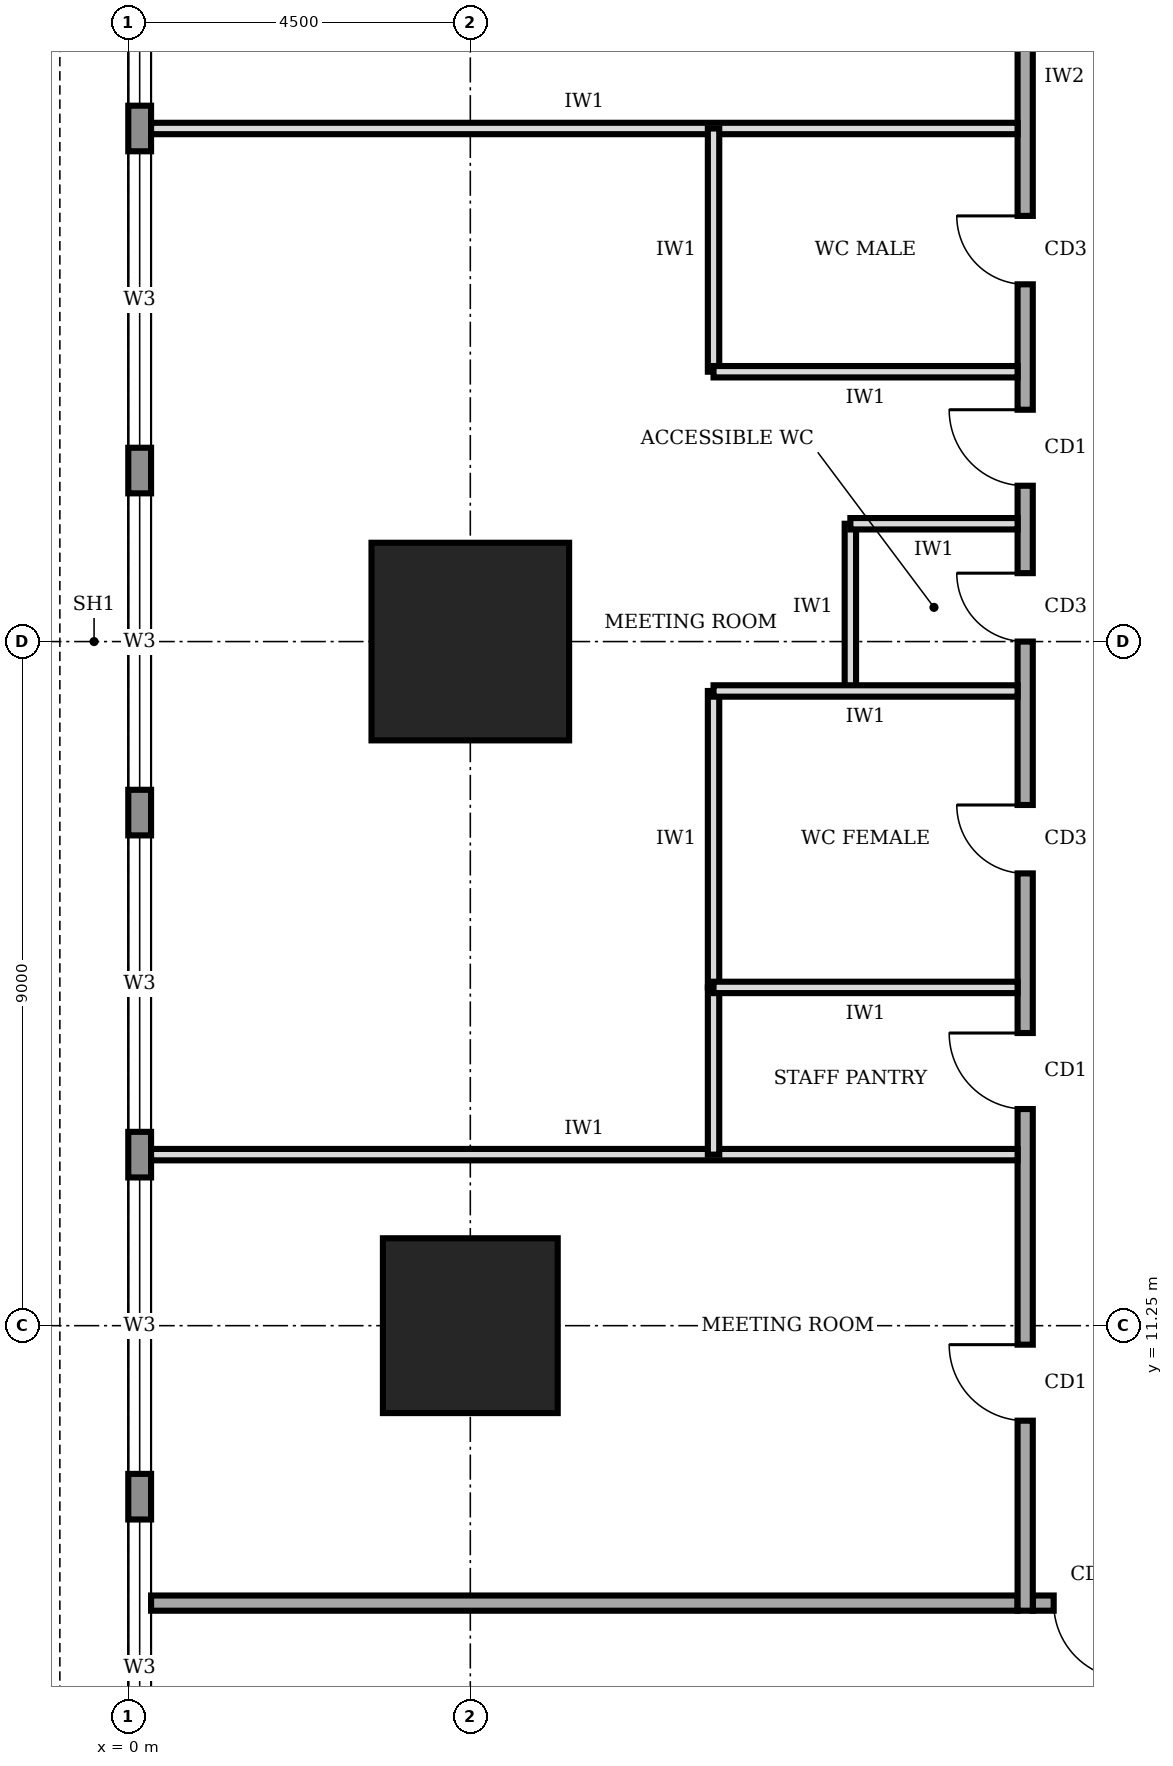
"""IFC4 building model, lengths in metres.
Left out: names, types, materials, properties, quantities, classifications, styles, units other than length and angle.
Written with IfcOpenShell. Run it as: python <this file> out.ifc"""

import sys

from ifc_helpers import new_model, si_unit, direction, frame, frame_2d, origin, origin_2d, place, context, subcontext, project, spatial, rectangle, extrude, element, fill, save


model = new_model("IFC4")
c1 = context("Model", 3, precision=1e-05, world=origin(), true_north=direction((0.0, 1.0)))
c2 = subcontext(c1, "Body", "Model", "MODEL_VIEW")
j1 = project(units=[si_unit("LENGTHUNIT", "METRE"), si_unit("PLANEANGLEUNIT", "RADIAN")], contexts=[c1])
p1 = place(None, origin())
s1 = spatial("IfcSite", under=j1, at=p1, CompositionType="ELEMENT")
p2 = place(p1, origin())
s2 = spatial("IfcBuilding", under=s1, at=p2, CompositionType="ELEMENT")
p3 = place(p2, frame((0.0, 0.0, 93.0)))
s3 = spatial("IfcBuildingStorey", under=s2, at=p3, CompositionType="ELEMENT", Elevation=93.0)
p4 = place(p3, frame((4.5, 11.25, 0.0), z_axis=(0.0, 0.0, 1.0), x_axis=(1.0, 0.0, 0.0)))
e1 = element("IfcColumn", 1, at=p4, inside=s3, PredefinedType="COLUMN", context=c2, shape_type="SweptSolid", body=[
    extrude(rectangle(XDim=2.3, YDim=2.3, at=origin_2d()), origin(), (0.0, 0.0, 1.0), 4.0),
])
p5 = place(p3, frame((4.5, 20.25, 0.0), z_axis=(0.0, 0.0, 1.0), x_axis=(1.0, 0.0, 0.0)))
e2 = element("IfcColumn", 2, at=p5, inside=s3, PredefinedType="COLUMN", context=c2, shape_type="SweptSolid", body=[
    extrude(rectangle(XDim=2.6, YDim=2.6, at=origin_2d()), origin(), (0.0, 0.0, 1.0), 4.0),
])
p6 = place(p3, frame((0.15, 35.98, 0.0), z_axis=(0.0, 0.0, 1.0), x_axis=(0.0, -1.0, 0.0)))
e3 = element("IfcWall", 3, at=p6, inside=s3, PredefinedType="STANDARD", context=c2, shape_type="SweptSolid", body=[
    extrude(rectangle(XDim=31.46, YDim=0.3, at=frame_2d((15.73, 0.0))), origin(), (0.0, 0.0, 1.0), 3.75),
])
p7 = place(p6, frame((27.28, 0.0, 0.95)))
e4 = element("IfcOpeningElement", 4, at=p7, cuts=e3, PredefinedType="OPENING", context=c2, shape_type="SweptSolid", body=[
    extrude(rectangle(XDim=3.9, YDim=1.8, at=frame_2d((1.95, 0.9))), frame((0.0, 0.16, 0.0), z_axis=(0.0, -1.0, 0.0), x_axis=(1.0, 0.0, 0.0)), (0.0, 0.0, 1.0), 0.32),
])
p8 = place(p6, frame((22.78, 0.0, 0.95)))
e5 = element("IfcOpeningElement", 5, at=p8, cuts=e3, PredefinedType="OPENING", context=c2, shape_type="SweptSolid", body=[
    extrude(rectangle(XDim=3.9, YDim=1.8, at=frame_2d((1.95, 0.9))), frame((0.0, 0.16, 0.0), z_axis=(0.0, -1.0, 0.0), x_axis=(1.0, 0.0, 0.0)), (0.0, 0.0, 1.0), 0.32),
])
p9 = place(p6, frame((18.28, 0.0, 0.95)))
e6 = element("IfcOpeningElement", 6, at=p9, cuts=e3, PredefinedType="OPENING", context=c2, shape_type="SweptSolid", body=[
    extrude(rectangle(XDim=3.9, YDim=1.8, at=frame_2d((1.95, 0.9))), frame((0.0, 0.16, 0.0), z_axis=(0.0, -1.0, 0.0), x_axis=(1.0, 0.0, 0.0)), (0.0, 0.0, 1.0), 0.32),
])
p10 = place(p6, frame((13.78, 0.0, 0.95)))
e7 = element("IfcOpeningElement", 7, at=p10, cuts=e3, PredefinedType="OPENING", context=c2, shape_type="SweptSolid", body=[
    extrude(rectangle(XDim=3.9, YDim=1.8, at=frame_2d((1.95, 0.9))), frame((0.0, 0.16, 0.0), z_axis=(0.0, -1.0, 0.0), x_axis=(1.0, 0.0, 0.0)), (0.0, 0.0, 1.0), 0.32),
])
p11 = place(p6, frame((9.28, 0.0, 0.95)))
e8 = element("IfcOpeningElement", 8, at=p11, cuts=e3, PredefinedType="OPENING", context=c2, shape_type="SweptSolid", body=[
    extrude(rectangle(XDim=3.9, YDim=1.8, at=frame_2d((1.95, 0.9))), frame((0.0, 0.16, 0.0), z_axis=(0.0, -1.0, 0.0), x_axis=(1.0, 0.0, 0.0)), (0.0, 0.0, 1.0), 0.32),
])
p12 = place(p6, frame((4.78, 0.0, 0.95)))
e9 = element("IfcOpeningElement", 9, at=p12, cuts=e3, PredefinedType="OPENING", context=c2, shape_type="SweptSolid", body=[
    extrude(rectangle(XDim=3.9, YDim=1.8, at=frame_2d((1.95, 0.9))), frame((0.0, 0.16, 0.0), z_axis=(0.0, -1.0, 0.0), x_axis=(1.0, 0.0, 0.0)), (0.0, 0.0, 1.0), 0.32),
])
p13 = place(p3, frame((11.9, 7.6, 0.0), z_axis=(0.0, 0.0, 1.0), x_axis=(1.0, 0.0, 0.0)))
e10 = element("IfcWall", 10, at=p13, inside=s3, PredefinedType="SOLIDWALL", context=c2, shape_type="SweptSolid", body=[
    extrude(rectangle(XDim=28.3, YDim=0.2, at=frame_2d((14.15, 0.0))), origin(), (0.0, 0.0, 1.0), 3.75),
])
p14 = place(p13, frame((0.275, 0.0, 0.0)))
e11 = element("IfcOpeningElement", 11, at=p14, cuts=e10, PredefinedType="OPENING", context=c2, shape_type="SweptSolid", body=[
    extrude(rectangle(XDim=1.0, YDim=2.1, at=frame_2d((0.5, 1.05))), frame((0.0, 0.11, 0.0), z_axis=(0.0, -1.0, 0.0), x_axis=(1.0, 0.0, 0.0)), (0.0, 0.0, 1.0), 0.22),
])
p15 = place(p13, frame((7.45, 0.0, 0.0)))
e12 = element("IfcOpeningElement", 12, at=p15, cuts=e10, PredefinedType="OPENING", context=c2, shape_type="SweptSolid", body=[
    extrude(rectangle(XDim=1.8, YDim=2.1, at=frame_2d((0.9, 1.05))), frame((0.0, 0.11, 0.0), z_axis=(0.0, -1.0, 0.0), x_axis=(1.0, 0.0, 0.0)), (0.0, 0.0, 1.0), 0.22),
])
p16 = place(p13, frame((21.3, 0.0, 0.0)))
e13 = element("IfcOpeningElement", 13, at=p16, cuts=e10, PredefinedType="OPENING", context=c2, shape_type="SweptSolid", body=[
    extrude(rectangle(XDim=1.0, YDim=2.1, at=frame_2d((0.5, 1.05))), frame((0.0, 0.11, 0.0), z_axis=(0.0, -1.0, 0.0), x_axis=(1.0, 0.0, 0.0)), (0.0, 0.0, 1.0), 0.22),
])
p17 = place(p3, frame((11.8, 32.8, 0.0), z_axis=(0.0, 0.0, 1.0), x_axis=(0.0, -1.0, 0.0)))
e14 = element("IfcWall", 14, at=p17, inside=s3, PredefinedType="SOLIDWALL", context=c2, shape_type="SweptSolid", body=[
    extrude(rectangle(XDim=25.3, YDim=0.2, at=frame_2d((12.65, 0.0))), origin(), (0.0, 0.0, 1.0), 3.75),
])
p18 = place(p17, frame((21.8, 0.0, 0.0)))
e15 = element("IfcOpeningElement", 15, at=p18, cuts=e14, PredefinedType="OPENING", context=c2, shape_type="SweptSolid", body=[
    extrude(rectangle(XDim=1.0, YDim=2.1, at=frame_2d((0.5, 1.05))), frame((0.0, 0.11, 0.0), z_axis=(0.0, -1.0, 0.0), x_axis=(1.0, 0.0, 0.0)), (0.0, 0.0, 1.0), 0.22),
])
p19 = place(p17, frame((17.7, 0.0, 0.0)))
e16 = element("IfcOpeningElement", 16, at=p19, cuts=e14, PredefinedType="OPENING", context=c2, shape_type="SweptSolid", body=[
    extrude(rectangle(XDim=1.0, YDim=2.1, at=frame_2d((0.5, 1.05))), frame((0.0, 0.11, 0.0), z_axis=(0.0, -1.0, 0.0), x_axis=(1.0, 0.0, 0.0)), (0.0, 0.0, 1.0), 0.22),
])
p20 = place(p17, frame((14.7, 0.0, 0.0)))
e17 = element("IfcOpeningElement", 17, at=p20, cuts=e14, PredefinedType="OPENING", context=c2, shape_type="SweptSolid", body=[
    extrude(rectangle(XDim=0.9, YDim=2.1, at=frame_2d((0.45, 1.05))), frame((0.0, 0.11, 0.0), z_axis=(0.0, -1.0, 0.0), x_axis=(1.0, 0.0, 0.0)), (0.0, 0.0, 1.0), 0.22),
])
p21 = place(p17, frame((11.65, 0.0, 0.0)))
e18 = element("IfcOpeningElement", 18, at=p21, cuts=e14, PredefinedType="OPENING", context=c2, shape_type="SweptSolid", body=[
    extrude(rectangle(XDim=0.9, YDim=2.1, at=frame_2d((0.45, 1.05))), frame((0.0, 0.11, 0.0), z_axis=(0.0, -1.0, 0.0), x_axis=(1.0, 0.0, 0.0)), (0.0, 0.0, 1.0), 0.22),
])
p22 = place(p17, frame((6.95, 0.0, 0.0)))
e19 = element("IfcOpeningElement", 19, at=p22, cuts=e14, PredefinedType="OPENING", context=c2, shape_type="SweptSolid", body=[
    extrude(rectangle(XDim=0.9, YDim=2.1, at=frame_2d((0.45, 1.05))), frame((0.0, 0.11, 0.0), z_axis=(0.0, -1.0, 0.0), x_axis=(1.0, 0.0, 0.0)), (0.0, 0.0, 1.0), 0.22),
])
p23 = place(p17, frame((9.5, 0.0, 0.0)))
e20 = element("IfcOpeningElement", 20, at=p23, cuts=e14, PredefinedType="OPENING", context=c2, shape_type="SweptSolid", body=[
    extrude(rectangle(XDim=1.0, YDim=2.1, at=frame_2d((0.5, 1.05))), frame((0.0, 0.11, 0.0), z_axis=(0.0, -1.0, 0.0), x_axis=(1.0, 0.0, 0.0)), (0.0, 0.0, 1.0), 0.22),
])
p24 = place(p17, frame((2.3, 0.0, 0.0)))
e21 = element("IfcOpeningElement", 21, at=p24, cuts=e14, PredefinedType="OPENING", context=c2, shape_type="SweptSolid", body=[
    extrude(rectangle(XDim=1.0, YDim=2.1, at=frame_2d((0.5, 1.05))), frame((0.0, 0.11, 0.0), z_axis=(0.0, -1.0, 0.0), x_axis=(1.0, 0.0, 0.0)), (0.0, 0.0, 1.0), 0.22),
])
p25 = place(p3, frame((0.3, 7.6, 0.0), z_axis=(0.0, 0.0, 1.0), x_axis=(1.0, 0.0, 0.0)))
e22 = element("IfcWall", 22, at=p25, inside=s3, PredefinedType="SOLIDWALL", context=c2, shape_type="SweptSolid", body=[
    extrude(rectangle(XDim=11.4, YDim=0.2, at=frame_2d((5.7, 0.0))), origin(), (0.0, 0.0, 1.0), 3.75),
])
for number, where, z_axis, x_axis in (
    (23, (0.3, 13.5, 0.0), (0.0, 0.0, 1.0), (1.0, 0.0, 0.0)),
    (24, (0.3, 27.0, 0.0), (0.0, 0.0, 1.0), (1.0, 0.0, 0.0)),
):
    element("IfcWall", number, at=place(p3, frame(where, z_axis=z_axis, x_axis=x_axis)), inside=s3, PredefinedType="PARTITIONING", context=c2, shape_type="SweptSolid", body=[
        extrude(rectangle(XDim=11.4, YDim=0.15, at=frame_2d((5.7, 0.0))), origin(), (0.0, 0.0, 1.0), 3.75),
    ])
p26 = place(p3, frame((11.7, 15.7, 0.0), z_axis=(0.0, 0.0, 1.0), x_axis=(-1.0, 0.0, 0.0)))
e25 = element("IfcWall", 25, at=p26, inside=s3, PredefinedType="PARTITIONING", context=c2, shape_type="SweptSolid", body=[
    extrude(rectangle(XDim=4.0, YDim=0.15, at=frame_2d((2.0, 0.0))), origin(), (0.0, 0.0, 1.0), 3.75),
])
p27 = place(p3, frame((11.7, 19.6, 0.0), z_axis=(0.0, 0.0, 1.0), x_axis=(-1.0, 0.0, 0.0)))
e26 = element("IfcWall", 26, at=p27, inside=s3, PredefinedType="PARTITIONING", context=c2, shape_type="SweptSolid", body=[
    extrude(rectangle(XDim=4.0, YDim=0.15, at=frame_2d((2.0, 0.0))), origin(), (0.0, 0.0, 1.0), 2.85),
])
p28 = place(p3, frame((11.7, 21.8, 0.0), z_axis=(0.0, 0.0, 1.0), x_axis=(-1.0, 0.0, 0.0)))
e27 = element("IfcWall", 27, at=p28, inside=s3, PredefinedType="PARTITIONING", context=c2, shape_type="SweptSolid", body=[
    extrude(rectangle(XDim=2.2, YDim=0.15, at=frame_2d((1.1, 0.0))), origin(), (0.0, 0.0, 1.0), 3.75),
])
p29 = place(p3, frame((11.7, 23.8, 0.0), z_axis=(0.0, 0.0, 1.0), x_axis=(-1.0, 0.0, 0.0)))
e28 = element("IfcWall", 28, at=p29, inside=s3, PredefinedType="PARTITIONING", context=c2, shape_type="SweptSolid", body=[
    extrude(rectangle(XDim=4.0, YDim=0.15, at=frame_2d((2.0, 0.0))), origin(), (0.0, 0.0, 1.0), 3.75),
])
p30 = place(p3, frame((7.7, 13.5, 0.0), z_axis=(0.0, 0.0, 1.0), x_axis=(0.0, 1.0, 0.0)))
e29 = element("IfcWall", 29, at=p30, inside=s3, PredefinedType="PARTITIONING", context=c2, shape_type="SweptSolid", body=[
    extrude(rectangle(XDim=2.2, YDim=0.15, at=frame_2d((1.1, 0.0))), origin(), (0.0, 0.0, 1.0), 3.75),
])
p31 = place(p3, frame((7.7, 15.7, 0.0), z_axis=(0.0, 0.0, 1.0), x_axis=(0.0, 1.0, 0.0)))
e30 = element("IfcWall", 30, at=p31, inside=s3, PredefinedType="PARTITIONING", context=c2, shape_type="SweptSolid", body=[
    extrude(rectangle(XDim=3.9, YDim=0.15, at=frame_2d((1.95, 0.0))), origin(), (0.0, 0.0, 1.0), 3.75),
])
p32 = place(p3, frame((9.5, 19.6, 0.0), z_axis=(0.0, 0.0, 1.0), x_axis=(0.0, 1.0, 0.0)))
e31 = element("IfcWall", 31, at=p32, inside=s3, PredefinedType="PARTITIONING", context=c2, shape_type="SweptSolid", body=[
    extrude(rectangle(XDim=2.2, YDim=0.15, at=frame_2d((1.1, 0.0))), origin(), (0.0, 0.0, 1.0), 3.75),
])
p33 = place(p3, frame((7.7, 23.8, 0.0), z_axis=(0.0, 0.0, 1.0), x_axis=(0.0, 1.0, 0.0)))
e32 = element("IfcWall", 32, at=p33, inside=s3, PredefinedType="PARTITIONING", context=c2, shape_type="SweptSolid", body=[
    extrude(rectangle(XDim=3.2, YDim=0.15, at=frame_2d((1.6, 0.0))), origin(), (0.0, 0.0, 1.0), 3.75),
])
p34 = place(p7, origin())
e33 = element("IfcWindow", 33, at=p34, inside=s3, PartitioningType="SINGLE_PANEL", PredefinedType="WINDOW", context=c2, shape_type="SweptSolid", body=[
    extrude(rectangle(XDim=3.9, YDim=1.8, at=frame_2d((1.95, 0.9))), frame((0.0, 0.03, 0.0), z_axis=(0.0, -1.0, 0.0), x_axis=(1.0, 0.0, 0.0)), (0.0, 0.0, 1.0), 0.06),
])
fill(e4, e33)
p35 = place(p8, origin())
e34 = element("IfcWindow", 34, at=p35, inside=s3, PartitioningType="SINGLE_PANEL", PredefinedType="WINDOW", context=c2, shape_type="SweptSolid", body=[
    extrude(rectangle(XDim=3.9, YDim=1.8, at=frame_2d((1.95, 0.9))), frame((0.0, 0.03, 0.0), z_axis=(0.0, -1.0, 0.0), x_axis=(1.0, 0.0, 0.0)), (0.0, 0.0, 1.0), 0.06),
])
fill(e5, e34)
p36 = place(p9, origin())
e35 = element("IfcWindow", 35, at=p36, inside=s3, PartitioningType="SINGLE_PANEL", PredefinedType="WINDOW", context=c2, shape_type="SweptSolid", body=[
    extrude(rectangle(XDim=3.9, YDim=1.8, at=frame_2d((1.95, 0.9))), frame((0.0, 0.03, 0.0), z_axis=(0.0, -1.0, 0.0), x_axis=(1.0, 0.0, 0.0)), (0.0, 0.0, 1.0), 0.06),
])
fill(e6, e35)
p37 = place(p10, origin())
e36 = element("IfcWindow", 36, at=p37, inside=s3, PartitioningType="SINGLE_PANEL", PredefinedType="WINDOW", context=c2, shape_type="SweptSolid", body=[
    extrude(rectangle(XDim=3.9, YDim=1.8, at=frame_2d((1.95, 0.9))), frame((0.0, 0.03, 0.0), z_axis=(0.0, -1.0, 0.0), x_axis=(1.0, 0.0, 0.0)), (0.0, 0.0, 1.0), 0.06),
])
fill(e7, e36)
p38 = place(p11, origin())
e37 = element("IfcWindow", 37, at=p38, inside=s3, PartitioningType="SINGLE_PANEL", PredefinedType="WINDOW", context=c2, shape_type="SweptSolid", body=[
    extrude(rectangle(XDim=3.9, YDim=1.8, at=frame_2d((1.95, 0.9))), frame((0.0, 0.03, 0.0), z_axis=(0.0, -1.0, 0.0), x_axis=(1.0, 0.0, 0.0)), (0.0, 0.0, 1.0), 0.06),
])
fill(e8, e37)
p39 = place(p12, origin())
e38 = element("IfcWindow", 38, at=p39, inside=s3, PartitioningType="SINGLE_PANEL", PredefinedType="WINDOW", context=c2, shape_type="SweptSolid", body=[
    extrude(rectangle(XDim=3.9, YDim=1.8, at=frame_2d((1.95, 0.9))), frame((0.0, 0.03, 0.0), z_axis=(0.0, -1.0, 0.0), x_axis=(1.0, 0.0, 0.0)), (0.0, 0.0, 1.0), 0.06),
])
fill(e9, e38)
p40 = place(p14, frame((1.0, 0.0, 0.0), z_axis=(0.0, 0.0, 1.0), x_axis=(-1.0, 0.0, 0.0)))
e39 = element("IfcDoor", 39, at=p40, inside=s3, OperationType="SINGLE_SWING_LEFT", PredefinedType="DOOR", context=c2, shape_type="SweptSolid", body=[
    extrude(rectangle(XDim=1.0, YDim=2.1, at=frame_2d((0.5, 1.05))), frame((0.0, 0.025, 0.0), z_axis=(0.0, -1.0, 0.0), x_axis=(1.0, 0.0, 0.0)), (0.0, 0.0, 1.0), 0.05),
])
fill(e11, e39)
p41 = place(p18, frame((1.0, 0.0, 0.0), z_axis=(0.0, 0.0, 1.0), x_axis=(-1.0, 0.0, 0.0)))
e40 = element("IfcDoor", 40, at=p41, inside=s3, OperationType="SINGLE_SWING_RIGHT", PredefinedType="DOOR", context=c2, shape_type="SweptSolid", body=[
    extrude(rectangle(XDim=1.0, YDim=2.1, at=frame_2d((0.5, 1.05))), frame((0.0, 0.025, 0.0), z_axis=(0.0, -1.0, 0.0), x_axis=(1.0, 0.0, 0.0)), (0.0, 0.0, 1.0), 0.05),
])
fill(e15, e40)
p42 = place(p19, frame((1.0, 0.0, 0.0), z_axis=(0.0, 0.0, 1.0), x_axis=(-1.0, 0.0, 0.0)))
e41 = element("IfcDoor", 41, at=p42, inside=s3, OperationType="SINGLE_SWING_RIGHT", PredefinedType="DOOR", context=c2, shape_type="SweptSolid", body=[
    extrude(rectangle(XDim=1.0, YDim=2.1, at=frame_2d((0.5, 1.05))), frame((0.0, 0.025, 0.0), z_axis=(0.0, -1.0, 0.0), x_axis=(1.0, 0.0, 0.0)), (0.0, 0.0, 1.0), 0.05),
])
fill(e16, e41)
p43 = place(p20, frame((0.9, 0.0, 0.0), z_axis=(0.0, 0.0, 1.0), x_axis=(-1.0, 0.0, 0.0)))
e42 = element("IfcDoor", 42, at=p43, inside=s3, OperationType="SINGLE_SWING_RIGHT", PredefinedType="DOOR", context=c2, shape_type="SweptSolid", body=[
    extrude(rectangle(XDim=0.9, YDim=2.1, at=frame_2d((0.45, 1.05))), frame((0.0, 0.025, 0.0), z_axis=(0.0, -1.0, 0.0), x_axis=(1.0, 0.0, 0.0)), (0.0, 0.0, 1.0), 0.05),
])
fill(e17, e42)
p44 = place(p21, frame((0.9, 0.0, 0.0), z_axis=(0.0, 0.0, 1.0), x_axis=(-1.0, 0.0, 0.0)))
e43 = element("IfcDoor", 43, at=p44, inside=s3, OperationType="SINGLE_SWING_RIGHT", PredefinedType="DOOR", context=c2, shape_type="SweptSolid", body=[
    extrude(rectangle(XDim=0.9, YDim=2.1, at=frame_2d((0.45, 1.05))), frame((0.0, 0.025, 0.0), z_axis=(0.0, -1.0, 0.0), x_axis=(1.0, 0.0, 0.0)), (0.0, 0.0, 1.0), 0.05),
])
fill(e18, e43)
p45 = place(p22, frame((0.9, 0.0, 0.0), z_axis=(0.0, 0.0, 1.0), x_axis=(-1.0, 0.0, 0.0)))
e44 = element("IfcDoor", 44, at=p45, inside=s3, OperationType="SINGLE_SWING_RIGHT", PredefinedType="DOOR", context=c2, shape_type="SweptSolid", body=[
    extrude(rectangle(XDim=0.9, YDim=2.1, at=frame_2d((0.45, 1.05))), frame((0.0, 0.025, 0.0), z_axis=(0.0, -1.0, 0.0), x_axis=(1.0, 0.0, 0.0)), (0.0, 0.0, 1.0), 0.05),
])
fill(e19, e44)
p46 = place(p23, frame((1.0, 0.0, 0.0), z_axis=(0.0, 0.0, 1.0), x_axis=(-1.0, 0.0, 0.0)))
e45 = element("IfcDoor", 45, at=p46, inside=s3, OperationType="SINGLE_SWING_RIGHT", PredefinedType="DOOR", context=c2, shape_type="SweptSolid", body=[
    extrude(rectangle(XDim=1.0, YDim=2.1, at=frame_2d((0.5, 1.05))), frame((0.0, 0.025, 0.0), z_axis=(0.0, -1.0, 0.0), x_axis=(1.0, 0.0, 0.0)), (0.0, 0.0, 1.0), 0.05),
])
fill(e20, e45)
save(model, sys.argv[1])
